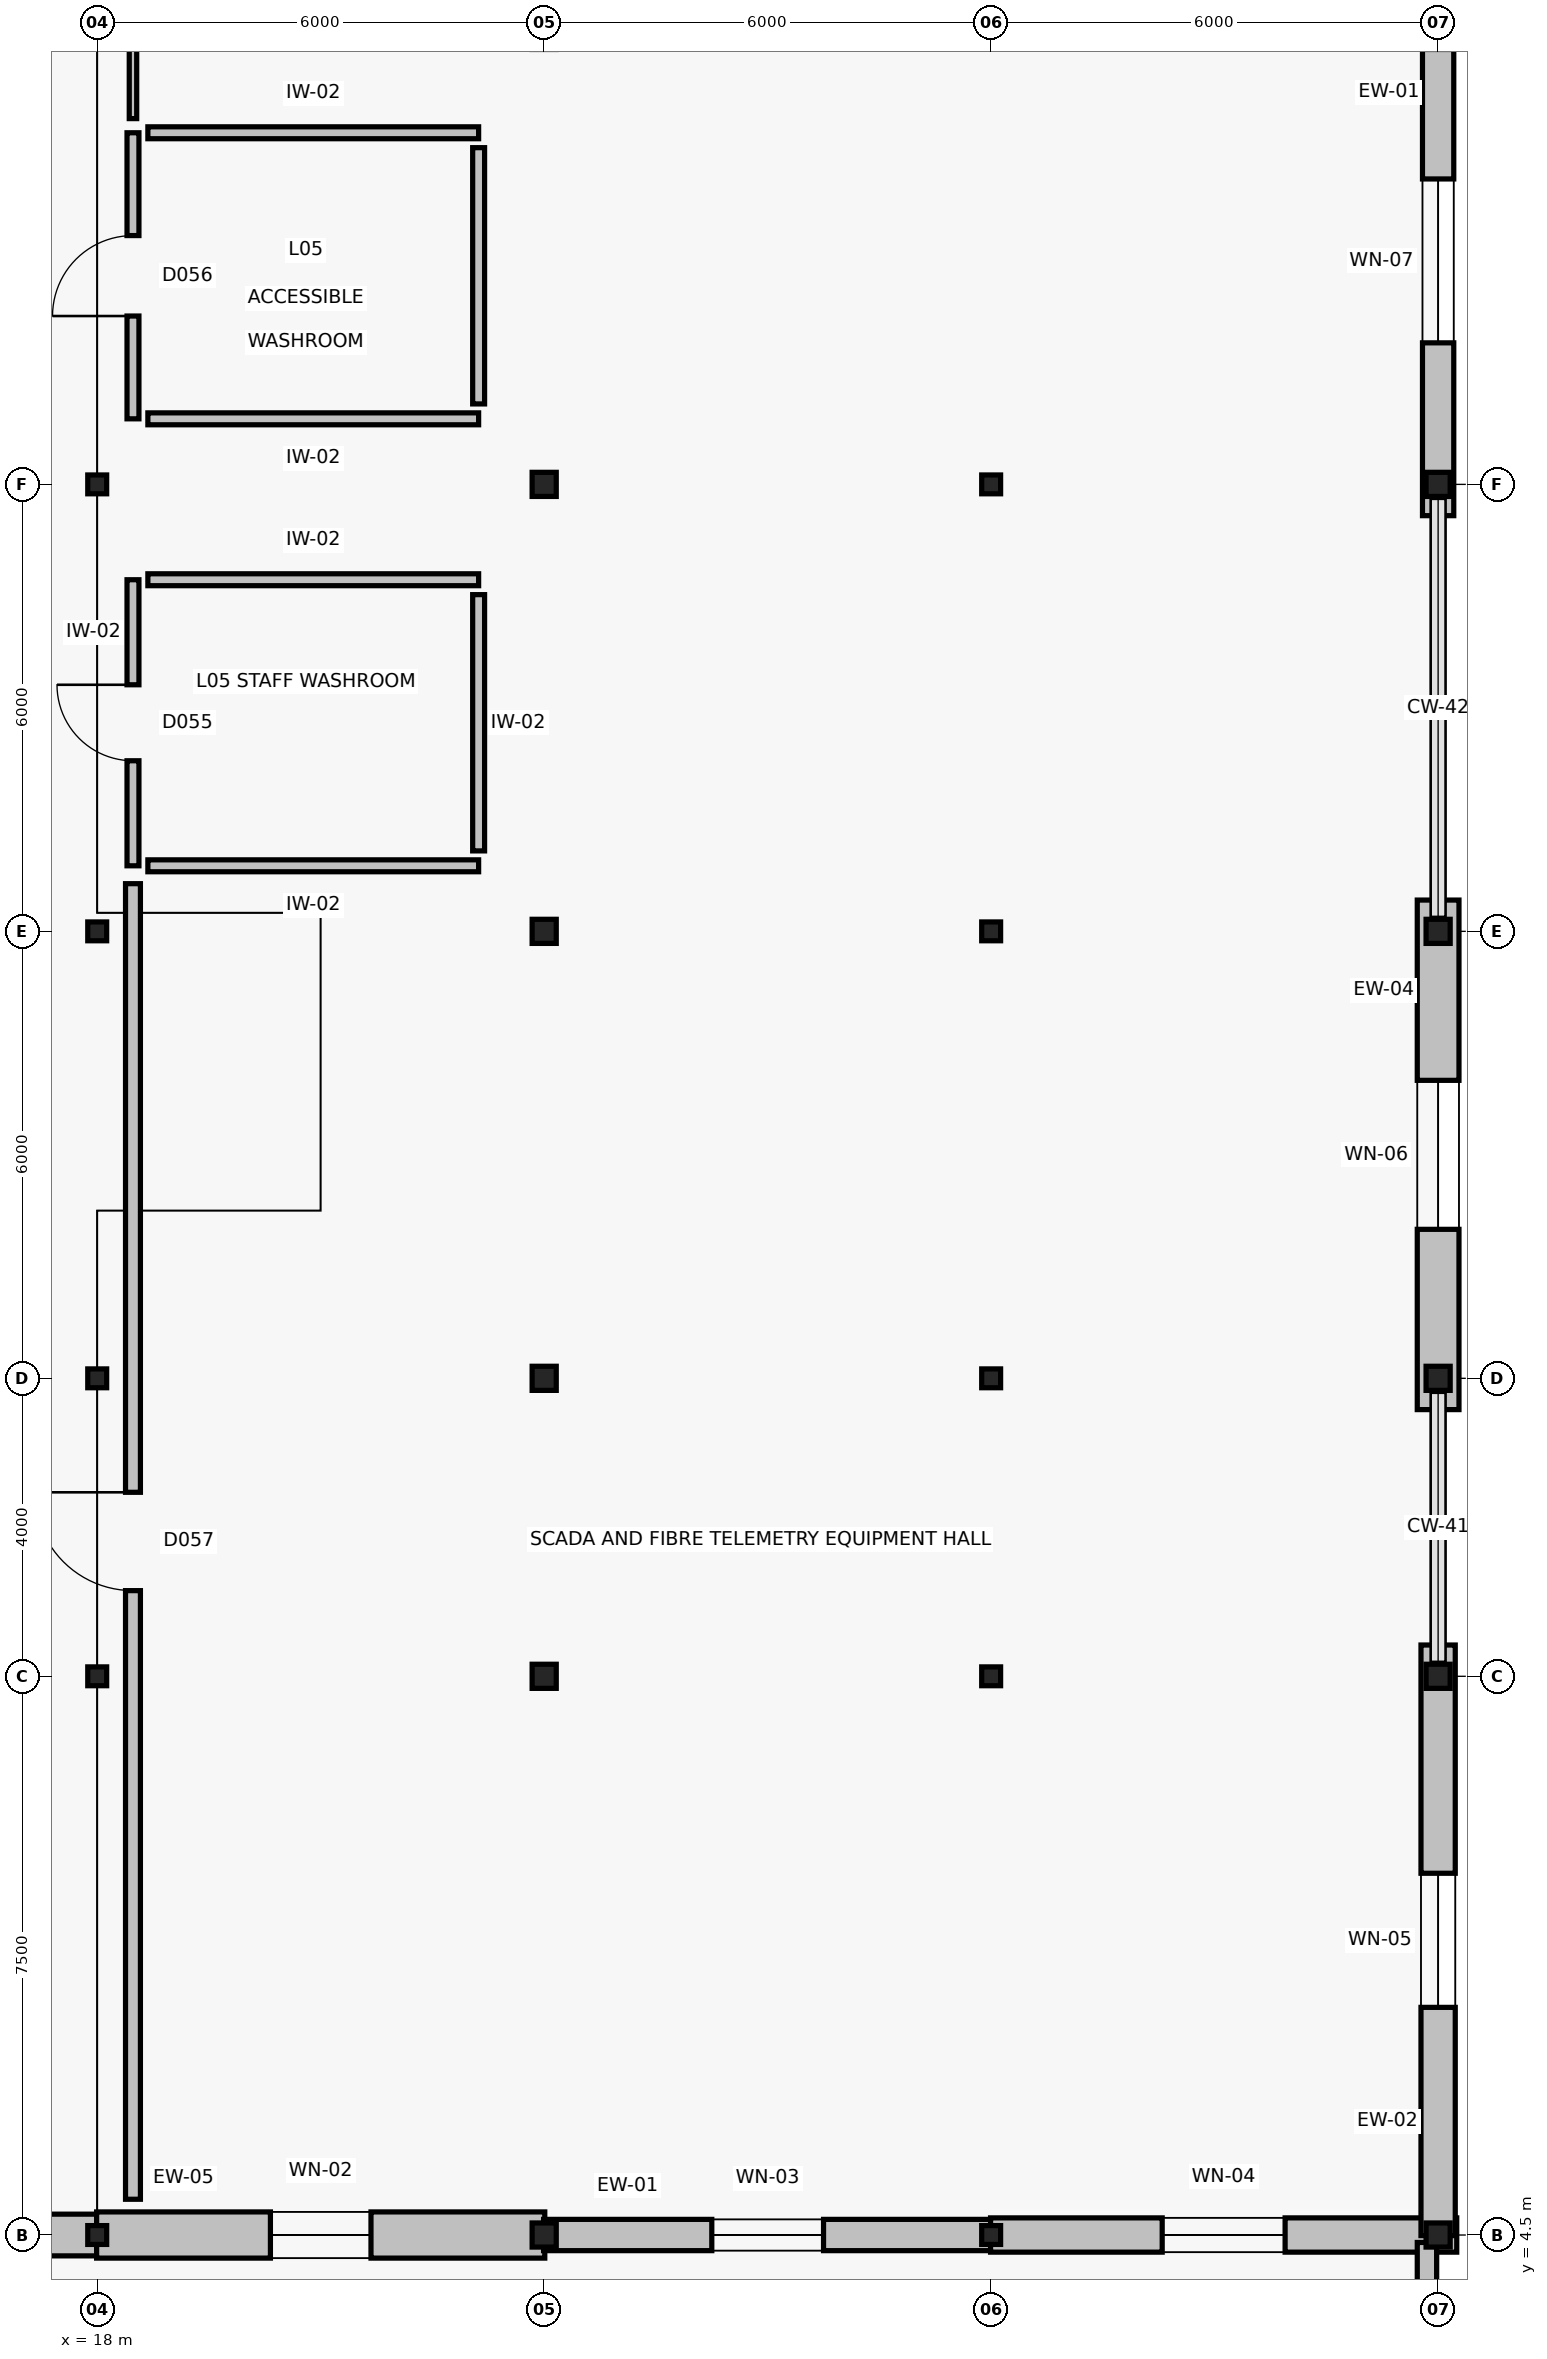
"""IFC4 building model, lengths in metres.
Left out: names, types, materials, properties, quantities, classifications, styles, units other than length and angle.
Written with IfcOpenShell. Run it as: python <this file> out.ifc"""

import sys

from ifc_helpers import new_model, si_unit, direction, frame, frame_2d, origin, origin_2d, place, context, subcontext, project, spatial, rectangle, hollow_circle, i_section, extrude, element, fill, save


model = new_model("IFC4")
c1 = context("Model", 3, precision=1e-05, world=origin(), true_north=direction((0.0, 1.0)))
c2 = subcontext(c1, "Body", "Model", "MODEL_VIEW")
j1 = project(units=[si_unit("LENGTHUNIT", "METRE"), si_unit("PLANEANGLEUNIT", "RADIAN")], contexts=[c1])
p1 = place(None, origin())
s1 = spatial("IfcSite", under=j1, at=p1, CompositionType="ELEMENT")
p2 = place(p1, origin())
s2 = spatial("IfcBuilding", under=s1, at=p2, CompositionType="ELEMENT")
p3 = place(p2, frame((0.0, 0.0, 19.4)))
s3 = spatial("IfcBuildingStorey", under=s2, at=p3, CompositionType="ELEMENT", Elevation=19.4)
for number, where, z_axis, x_axis in (
    (1, (18.0, 4.5, 0.0), (0.0, 0.0, 1.0), (1.0, 0.0, 0.0)),
    (2, (18.0, 12.0, 0.0), (0.0, 0.0, 1.0), (1.0, 0.0, 0.0)),
    (3, (18.0, 16.0, 0.0), (0.0, 0.0, 1.0), (1.0, 0.0, 0.0)),
    (4, (18.0, 22.0, 0.0), (0.0, 0.0, 1.0), (1.0, 0.0, 0.0)),
    (5, (18.0, 28.0, 0.0), (0.0, 0.0, 1.0), (1.0, 0.0, 0.0)),
):
    element("IfcColumn", number, at=place(p3, frame(where, z_axis=z_axis, x_axis=x_axis)), inside=s3, PredefinedType="COLUMN", context=c2, shape_type="SweptSolid", body=[
        extrude(i_section(OverallWidth=0.254, OverallDepth=0.253, WebThickness=0.009, FlangeThickness=0.014, FilletRadius=0.012, at=origin_2d()), origin(), (0.0, 0.0, 1.0), 4.2),
    ])
for number, where, z_axis, x_axis in (
    (6, (24.0, 4.5, 0.0), (0.0, 0.0, 1.0), (1.0, 0.0, 0.0)),
    (7, (24.0, 12.0, 0.0), (0.0, 0.0, 1.0), (1.0, 0.0, 0.0)),
    (8, (24.0, 16.0, 0.0), (0.0, 0.0, 1.0), (1.0, 0.0, 0.0)),
    (9, (24.0, 22.0, 0.0), (0.0, 0.0, 1.0), (1.0, 0.0, 0.0)),
    (10, (24.0, 28.0, 0.0), (0.0, 0.0, 1.0), (1.0, 0.0, 0.0)),
):
    element("IfcColumn", number, at=place(p3, frame(where, z_axis=z_axis, x_axis=x_axis)), inside=s3, PredefinedType="COLUMN", context=c2, shape_type="SweptSolid", body=[
        extrude(hollow_circle(Radius=0.162, WallThickness=0.013, at=origin_2d()), origin(), (0.0, 0.0, 1.0), 4.2),
    ])
for number, where, z_axis, x_axis in (
    (11, (30.0, 4.5, 0.0), (0.0, 0.0, 1.0), (1.0, 0.0, 0.0)),
    (12, (30.0, 12.0, 0.0), (0.0, 0.0, 1.0), (1.0, 0.0, 0.0)),
    (13, (30.0, 16.0, 0.0), (0.0, 0.0, 1.0), (1.0, 0.0, 0.0)),
    (14, (30.0, 22.0, 0.0), (0.0, 0.0, 1.0), (1.0, 0.0, 0.0)),
    (15, (30.0, 28.0, 0.0), (0.0, 0.0, 1.0), (1.0, 0.0, 0.0)),
):
    element("IfcColumn", number, at=place(p3, frame(where, z_axis=z_axis, x_axis=x_axis)), inside=s3, PredefinedType="COLUMN", context=c2, shape_type="SweptSolid", body=[
        extrude(i_section(OverallWidth=0.254, OverallDepth=0.253, WebThickness=0.009, FlangeThickness=0.014, FilletRadius=0.012, at=origin_2d()), origin(), (0.0, 0.0, 1.0), 4.2),
    ])
for number, where, z_axis, x_axis in (
    (16, (36.0, 4.5, 0.0), (0.0, 0.0, 1.0), (1.0, 0.0, 0.0)),
    (17, (36.0, 12.0, 0.0), (0.0, 0.0, 1.0), (1.0, 0.0, 0.0)),
    (18, (36.0, 16.0, 0.0), (0.0, 0.0, 1.0), (1.0, 0.0, 0.0)),
    (19, (36.0, 22.0, 0.0), (0.0, 0.0, 1.0), (1.0, 0.0, 0.0)),
    (20, (36.0, 28.0, 0.0), (0.0, 0.0, 1.0), (1.0, 0.0, 0.0)),
):
    element("IfcColumn", number, at=place(p3, frame(where, z_axis=z_axis, x_axis=x_axis)), inside=s3, PredefinedType="COLUMN", context=c2, shape_type="SweptSolid", body=[
        extrude(hollow_circle(Radius=0.162, WallThickness=0.013, at=origin_2d()), origin(), (0.0, 0.0, 1.0), 4.2),
    ])
p4 = place(p3, frame((11.992, 4.5, 0.0), z_axis=(0.0, 0.0, 1.0), x_axis=(1.0, 0.0, 0.0)))
e21 = element("IfcWall", 21, at=p4, inside=s3, PredefinedType="SOLIDWALL", context=c2, shape_type="SweptSolid", body=[
    extrude(rectangle(XDim=6.016, YDim=0.56, at=frame_2d((3.008, 0.0))), origin(), (0.0, 0.0, 1.0), 3.387),
])
p5 = place(p4, frame((2.408, 0.0, 0.9)))
e22 = element("IfcOpeningElement", 22, at=p5, cuts=e21, PredefinedType="OPENING", context=c2, shape_type="SweptSolid", body=[
    extrude(rectangle(XDim=1.2, YDim=1.8, at=frame_2d((0.6, 0.9))), frame((0.0, 0.295, 0.0), z_axis=(0.0, -1.0, 0.0), x_axis=(1.0, 0.0, 0.0)), (0.0, 0.0, 1.0), 0.59),
])
p6 = place(p3, frame((17.992, 4.5, 0.0), z_axis=(0.0, 0.0, 1.0), x_axis=(1.0, 0.0, 0.0)))
e23 = element("IfcWall", 23, at=p6, inside=s3, PredefinedType="SOLIDWALL", context=c2, shape_type="SweptSolid", body=[
    extrude(rectangle(XDim=6.016, YDim=0.62, at=frame_2d((3.008, 0.0))), origin(), (0.0, 0.0, 1.0), 3.311),
])
p7 = place(p6, frame((2.333, 0.0, 0.9)))
e24 = element("IfcOpeningElement", 24, at=p7, cuts=e23, PredefinedType="OPENING", context=c2, shape_type="SweptSolid", body=[
    extrude(rectangle(XDim=1.35, YDim=1.8, at=frame_2d((0.675, 0.9))), frame((0.0, 0.325, 0.0), z_axis=(0.0, -1.0, 0.0), x_axis=(1.0, 0.0, 0.0)), (0.0, 0.0, 1.0), 0.65),
])
p8 = place(p3, frame((23.992, 4.5, 0.0), z_axis=(0.0, 0.0, 1.0), x_axis=(1.0, 0.0, 0.0)))
e25 = element("IfcWall", 25, at=p8, inside=s3, PredefinedType="SOLIDWALL", context=c2, shape_type="SweptSolid", body=[
    extrude(rectangle(XDim=6.016, YDim=0.42, at=frame_2d((3.008, 0.0))), origin(), (0.0, 0.0, 1.0), 3.311),
])
p9 = place(p8, frame((2.258, 0.0, 0.9)))
e26 = element("IfcOpeningElement", 26, at=p9, cuts=e25, PredefinedType="OPENING", context=c2, shape_type="SweptSolid", body=[
    extrude(rectangle(XDim=1.5, YDim=1.8, at=frame_2d((0.75, 0.9))), frame((0.0, 0.225, 0.0), z_axis=(0.0, -1.0, 0.0), x_axis=(1.0, 0.0, 0.0)), (0.0, 0.0, 1.0), 0.45),
])
p10 = place(p3, frame((29.992, 4.5, 0.0), z_axis=(0.0, 0.0, 1.0), x_axis=(1.0, 0.0, 0.0)))
e27 = element("IfcWall", 27, at=p10, inside=s3, PredefinedType="SOLIDWALL", context=c2, shape_type="SweptSolid", body=[
    extrude(rectangle(XDim=6.258, YDim=0.46, at=frame_2d((3.129, 0.0))), origin(), (0.0, 0.0, 1.0), 3.311),
])
p11 = place(p10, frame((2.304, 0.0, 0.9)))
e28 = element("IfcOpeningElement", 28, at=p11, cuts=e27, PredefinedType="OPENING", context=c2, shape_type="SweptSolid", body=[
    extrude(rectangle(XDim=1.65, YDim=1.8, at=frame_2d((0.825, 0.9))), frame((0.0, 0.245, 0.0), z_axis=(0.0, -1.0, 0.0), x_axis=(1.0, 0.0, 0.0)), (0.0, 0.0, 1.0), 0.49),
])
p12 = place(p3, frame((36.0, 4.492, 0.0), z_axis=(0.0, 0.0, 1.0), x_axis=(0.0, 1.0, 0.0)))
e29 = element("IfcWall", 29, at=p12, inside=s3, PredefinedType="SOLIDWALL", context=c2, shape_type="SweptSolid", body=[
    extrude(rectangle(XDim=7.928, YDim=0.46, at=frame_2d((3.964, 0.0))), origin(), (0.0, 0.0, 1.0), 3.387),
])
p13 = place(p12, frame((3.064, 0.0, 0.9)))
e30 = element("IfcOpeningElement", 30, at=p13, cuts=e29, PredefinedType="OPENING", context=c2, shape_type="SweptSolid", body=[
    extrude(rectangle(XDim=1.8, YDim=1.8, at=frame_2d((0.9, 0.9))), frame((0.0, 0.245, 0.0), z_axis=(0.0, -1.0, 0.0), x_axis=(1.0, 0.0, 0.0)), (0.0, 0.0, 1.0), 0.49),
])
p14 = place(p3, frame((36.0, 15.58, 0.0), z_axis=(0.0, 0.0, 1.0), x_axis=(0.0, 1.0, 0.0)))
e31 = element("IfcWall", 31, at=p14, inside=s3, PredefinedType="SOLIDWALL", context=c2, shape_type="SweptSolid", body=[
    extrude(rectangle(XDim=6.84, YDim=0.56, at=frame_2d((3.42, 0.0))), origin(), (0.0, 0.0, 1.0), 3.387),
])
p15 = place(p14, frame((2.42, 0.0, 0.9)))
e32 = element("IfcOpeningElement", 32, at=p15, cuts=e31, PredefinedType="OPENING", context=c2, shape_type="SweptSolid", body=[
    extrude(rectangle(XDim=2.0, YDim=1.8, at=frame_2d((1.0, 0.9))), frame((0.0, 0.295, 0.0), z_axis=(0.0, -1.0, 0.0), x_axis=(1.0, 0.0, 0.0)), (0.0, 0.0, 1.0), 0.59),
])
p16 = place(p3, frame((36.0, 27.58, 0.0), z_axis=(0.0, 0.0, 1.0), x_axis=(0.0, 1.0, 0.0)))
e33 = element("IfcWall", 33, at=p16, inside=s3, PredefinedType="SOLIDWALL", context=c2, shape_type="SweptSolid", body=[
    extrude(rectangle(XDim=6.84, YDim=0.42, at=frame_2d((3.42, 0.0))), origin(), (0.0, 0.0, 1.0), 3.311),
])
p17 = place(p16, frame((2.32, 0.0, 0.9)))
e34 = element("IfcOpeningElement", 34, at=p17, cuts=e33, PredefinedType="OPENING", context=c2, shape_type="SweptSolid", body=[
    extrude(rectangle(XDim=2.2, YDim=1.8, at=frame_2d((1.1, 0.9))), frame((0.0, 0.225, 0.0), z_axis=(0.0, -1.0, 0.0), x_axis=(1.0, 0.0, 0.0)), (0.0, 0.0, 1.0), 0.45),
])
p18 = place(p3, frame((35.85, 0.15, 0.0), z_axis=(0.0, 0.0, 1.0), x_axis=(0.0, 1.0, 0.0)))
e35 = element("IfcWall", 35, at=p18, inside=s3, PredefinedType="PARAPET", context=c2, shape_type="SweptSolid", body=[
    extrude(rectangle(XDim=4.25, YDim=0.26, at=frame_2d((2.125, 0.0))), origin(), (0.0, 0.0, 1.0), 1.15),
])
p19 = place(p3, frame((18.48, 22.88, 0.0), z_axis=(0.0, 0.0, 1.0), x_axis=(0.0, 1.0, 0.0)))
e36 = element("IfcWall", 36, at=p19, inside=s3, PredefinedType="PARTITIONING", context=c2, shape_type="SweptSolid", body=[
    extrude(rectangle(XDim=3.84, YDim=0.16, at=frame_2d((1.92, 0.0))), origin(), (0.0, 0.0, 1.0), 3.88),
])
p20 = place(p19, frame((1.41, 0.0, 0.0)))
e37 = element("IfcOpeningElement", 37, at=p20, cuts=e36, PredefinedType="OPENING", context=c2, shape_type="SweptSolid", body=[
    extrude(rectangle(XDim=1.02, YDim=2.1, at=frame_2d((0.51, 1.05))), frame((0.0, 0.095, 0.0), z_axis=(0.0, -1.0, 0.0), x_axis=(1.0, 0.0, 0.0)), (0.0, 0.0, 1.0), 0.19),
])
for number, where, z_axis, x_axis in (
    (38, (18.68, 26.72, 0.0), (0.0, 0.0, 1.0), (1.0, 0.0, 0.0)),
    (39, (23.12, 22.88, 0.0), (0.0, 0.0, 1.0), (-1.0, 0.0, 0.0)),
):
    element("IfcWall", number, at=place(p3, frame(where, z_axis=z_axis, x_axis=x_axis)), inside=s3, PredefinedType="PARTITIONING", context=c2, shape_type="SweptSolid", body=[
        extrude(rectangle(XDim=4.44, YDim=0.16, at=frame_2d((2.22, 0.0))), origin(), (0.0, 0.0, 1.0), 3.536),
    ])
p21 = place(p3, frame((23.12, 26.52, 0.0), z_axis=(0.0, 0.0, 1.0), x_axis=(0.0, -1.0, 0.0)))
e40 = element("IfcWall", 40, at=p21, inside=s3, PredefinedType="PARTITIONING", context=c2, shape_type="SweptSolid", body=[
    extrude(rectangle(XDim=3.44, YDim=0.16, at=frame_2d((1.72, 0.0))), origin(), (0.0, 0.0, 1.0), 3.88),
])
p22 = place(p3, frame((18.48, 28.88, 0.0), z_axis=(0.0, 0.0, 1.0), x_axis=(0.0, 1.0, 0.0)))
e41 = element("IfcWall", 41, at=p22, inside=s3, PredefinedType="PARTITIONING", context=c2, shape_type="SweptSolid", body=[
    extrude(rectangle(XDim=3.84, YDim=0.16, at=frame_2d((1.92, 0.0))), origin(), (0.0, 0.0, 1.0), 3.88),
])
p23 = place(p22, frame((1.38, 0.0, 0.0)))
e42 = element("IfcOpeningElement", 42, at=p23, cuts=e41, PredefinedType="OPENING", context=c2, shape_type="SweptSolid", body=[
    extrude(rectangle(XDim=1.08, YDim=2.15, at=frame_2d((0.54, 1.075))), frame((0.0, 0.095, 0.0), z_axis=(0.0, -1.0, 0.0), x_axis=(1.0, 0.0, 0.0)), (0.0, 0.0, 1.0), 0.19),
])
for number, where, z_axis, x_axis in (
    (43, (18.68, 32.72, 0.0), (0.0, 0.0, 1.0), (1.0, 0.0, 0.0)),
    (44, (23.12, 28.88, 0.0), (0.0, 0.0, 1.0), (-1.0, 0.0, 0.0)),
):
    element("IfcWall", number, at=place(p3, frame(where, z_axis=z_axis, x_axis=x_axis)), inside=s3, PredefinedType="PARTITIONING", context=c2, shape_type="SweptSolid", body=[
        extrude(rectangle(XDim=4.44, YDim=0.16, at=frame_2d((2.22, 0.0))), origin(), (0.0, 0.0, 1.0), 3.492),
    ])
p24 = place(p3, frame((23.12, 32.52, 0.0), z_axis=(0.0, 0.0, 1.0), x_axis=(0.0, -1.0, 0.0)))
e45 = element("IfcWall", 45, at=p24, inside=s3, PredefinedType="PARTITIONING", context=c2, shape_type="SweptSolid", body=[
    extrude(rectangle(XDim=3.44, YDim=0.16, at=frame_2d((1.72, 0.0))), origin(), (0.0, 0.0, 1.0), 3.88),
])
p25 = place(p3, frame((18.48, 4.98, 0.0), z_axis=(0.0, 0.0, 1.0), x_axis=(0.0, 1.0, 0.0)))
e46 = element("IfcWall", 46, at=p25, inside=s3, PredefinedType="PARTITIONING", context=c2, shape_type="SweptSolid", body=[
    extrude(rectangle(XDim=17.66, YDim=0.2, at=frame_2d((8.83, 0.0))), origin(), (0.0, 0.0, 1.0), 3.387),
])
p26 = place(p25, frame((8.17, 0.0, 0.0)))
e47 = element("IfcOpeningElement", 47, at=p26, cuts=e46, PredefinedType="OPENING", context=c2, shape_type="SweptSolid", body=[
    extrude(rectangle(XDim=1.32, YDim=2.2, at=frame_2d((0.66, 1.1))), frame((0.0, 0.115, 0.0), z_axis=(0.0, -1.0, 0.0), x_axis=(1.0, 0.0, 0.0)), (0.0, 0.0, 1.0), 0.23),
])
p27 = place(p3, frame((18.48, 32.91, 0.0), z_axis=(0.0, 0.0, 1.0), x_axis=(0.0, 1.0, 0.0)))
e48 = element("IfcWall", 48, at=p27, inside=s3, PredefinedType="PARTITIONING", context=c2, shape_type="SweptSolid", body=[
    extrude(rectangle(XDim=32.41, YDim=0.1, at=frame_2d((16.205, 0.0))), origin(), (0.0, 0.0, 1.0), 3.311),
])
p28 = place(p27, frame((20.287, 0.0, 0.0)))
e49 = element("IfcOpeningElement", 49, at=p28, cuts=e48, PredefinedType="OPENING", context=c2, shape_type="SweptSolid", body=[
    extrude(rectangle(XDim=1.2, YDim=2.15, at=frame_2d((0.6, 1.075))), frame((0.0, 0.065, 0.0), z_axis=(0.0, -1.0, 0.0), x_axis=(1.0, 0.0, 0.0)), (0.0, 0.0, 1.0), 0.13),
])
p29 = place(p7, origin())
e50 = element("IfcWindow", 50, at=p29, inside=s3, PartitioningType="SINGLE_PANEL", PredefinedType="WINDOW", context=c2, shape_type="SweptSolid", body=[
    extrude(rectangle(XDim=1.35, YDim=1.8, at=frame_2d((0.675, 0.9))), frame((0.0, 0.03, 0.0), z_axis=(0.0, -1.0, 0.0), x_axis=(1.0, 0.0, 0.0)), (0.0, 0.0, 1.0), 0.06),
])
fill(e24, e50)
p30 = place(p9, origin())
e51 = element("IfcWindow", 51, at=p30, inside=s3, PartitioningType="SINGLE_PANEL", PredefinedType="WINDOW", context=c2, shape_type="SweptSolid", body=[
    extrude(rectangle(XDim=1.5, YDim=1.8, at=frame_2d((0.75, 0.9))), frame((0.0, 0.03, 0.0), z_axis=(0.0, -1.0, 0.0), x_axis=(1.0, 0.0, 0.0)), (0.0, 0.0, 1.0), 0.06),
])
fill(e26, e51)
p31 = place(p11, origin())
e52 = element("IfcWindow", 52, at=p31, inside=s3, PartitioningType="SINGLE_PANEL", PredefinedType="WINDOW", context=c2, shape_type="SweptSolid", body=[
    extrude(rectangle(XDim=1.65, YDim=1.8, at=frame_2d((0.825, 0.9))), frame((0.0, 0.03, 0.0), z_axis=(0.0, -1.0, 0.0), x_axis=(1.0, 0.0, 0.0)), (0.0, 0.0, 1.0), 0.06),
])
fill(e28, e52)
p32 = place(p13, origin())
e53 = element("IfcWindow", 53, at=p32, inside=s3, PartitioningType="SINGLE_PANEL", PredefinedType="WINDOW", context=c2, shape_type="SweptSolid", body=[
    extrude(rectangle(XDim=1.8, YDim=1.8, at=frame_2d((0.9, 0.9))), frame((0.0, 0.03, 0.0), z_axis=(0.0, -1.0, 0.0), x_axis=(1.0, 0.0, 0.0)), (0.0, 0.0, 1.0), 0.06),
])
fill(e30, e53)
p33 = place(p15, origin())
e54 = element("IfcWindow", 54, at=p33, inside=s3, PartitioningType="SINGLE_PANEL", PredefinedType="WINDOW", context=c2, shape_type="SweptSolid", body=[
    extrude(rectangle(XDim=2.0, YDim=1.8, at=frame_2d((1.0, 0.9))), frame((0.0, 0.03, 0.0), z_axis=(0.0, -1.0, 0.0), x_axis=(1.0, 0.0, 0.0)), (0.0, 0.0, 1.0), 0.06),
])
fill(e32, e54)
p34 = place(p17, origin())
e55 = element("IfcWindow", 55, at=p34, inside=s3, PartitioningType="SINGLE_PANEL", PredefinedType="WINDOW", context=c2, shape_type="SweptSolid", body=[
    extrude(rectangle(XDim=2.2, YDim=1.8, at=frame_2d((1.1, 0.9))), frame((0.0, 0.03, 0.0), z_axis=(0.0, -1.0, 0.0), x_axis=(1.0, 0.0, 0.0)), (0.0, 0.0, 1.0), 0.06),
])
fill(e34, e55)
p35 = place(p20, origin())
e56 = element("IfcDoor", 56, at=p35, inside=s3, OperationType="SINGLE_SWING_RIGHT", PredefinedType="DOOR", context=c2, shape_type="SweptSolid", body=[
    extrude(rectangle(XDim=1.02, YDim=2.1, at=frame_2d((0.51, 1.05))), frame((0.0, 0.025, 0.0), z_axis=(0.0, -1.0, 0.0), x_axis=(1.0, 0.0, 0.0)), (0.0, 0.0, 1.0), 0.05),
])
fill(e37, e56)
p36 = place(p23, origin())
e57 = element("IfcDoor", 57, at=p36, inside=s3, OperationType="SINGLE_SWING_LEFT", PredefinedType="DOOR", context=c2, shape_type="SweptSolid", body=[
    extrude(rectangle(XDim=1.08, YDim=2.15, at=frame_2d((0.54, 1.075))), frame((0.0, 0.025, 0.0), z_axis=(0.0, -1.0, 0.0), x_axis=(1.0, 0.0, 0.0)), (0.0, 0.0, 1.0), 0.05),
])
fill(e42, e57)
p37 = place(p26, origin())
e58 = element("IfcDoor", 58, at=p37, inside=s3, OperationType="SINGLE_SWING_RIGHT", PredefinedType="DOOR", context=c2, shape_type="SweptSolid", body=[
    extrude(rectangle(XDim=1.32, YDim=2.2, at=frame_2d((0.66, 1.1))), frame((0.0, 0.025, 0.0), z_axis=(0.0, -1.0, 0.0), x_axis=(1.0, 0.0, 0.0)), (0.0, 0.0, 1.0), 0.05),
])
fill(e47, e58)
save(model, sys.argv[1])
